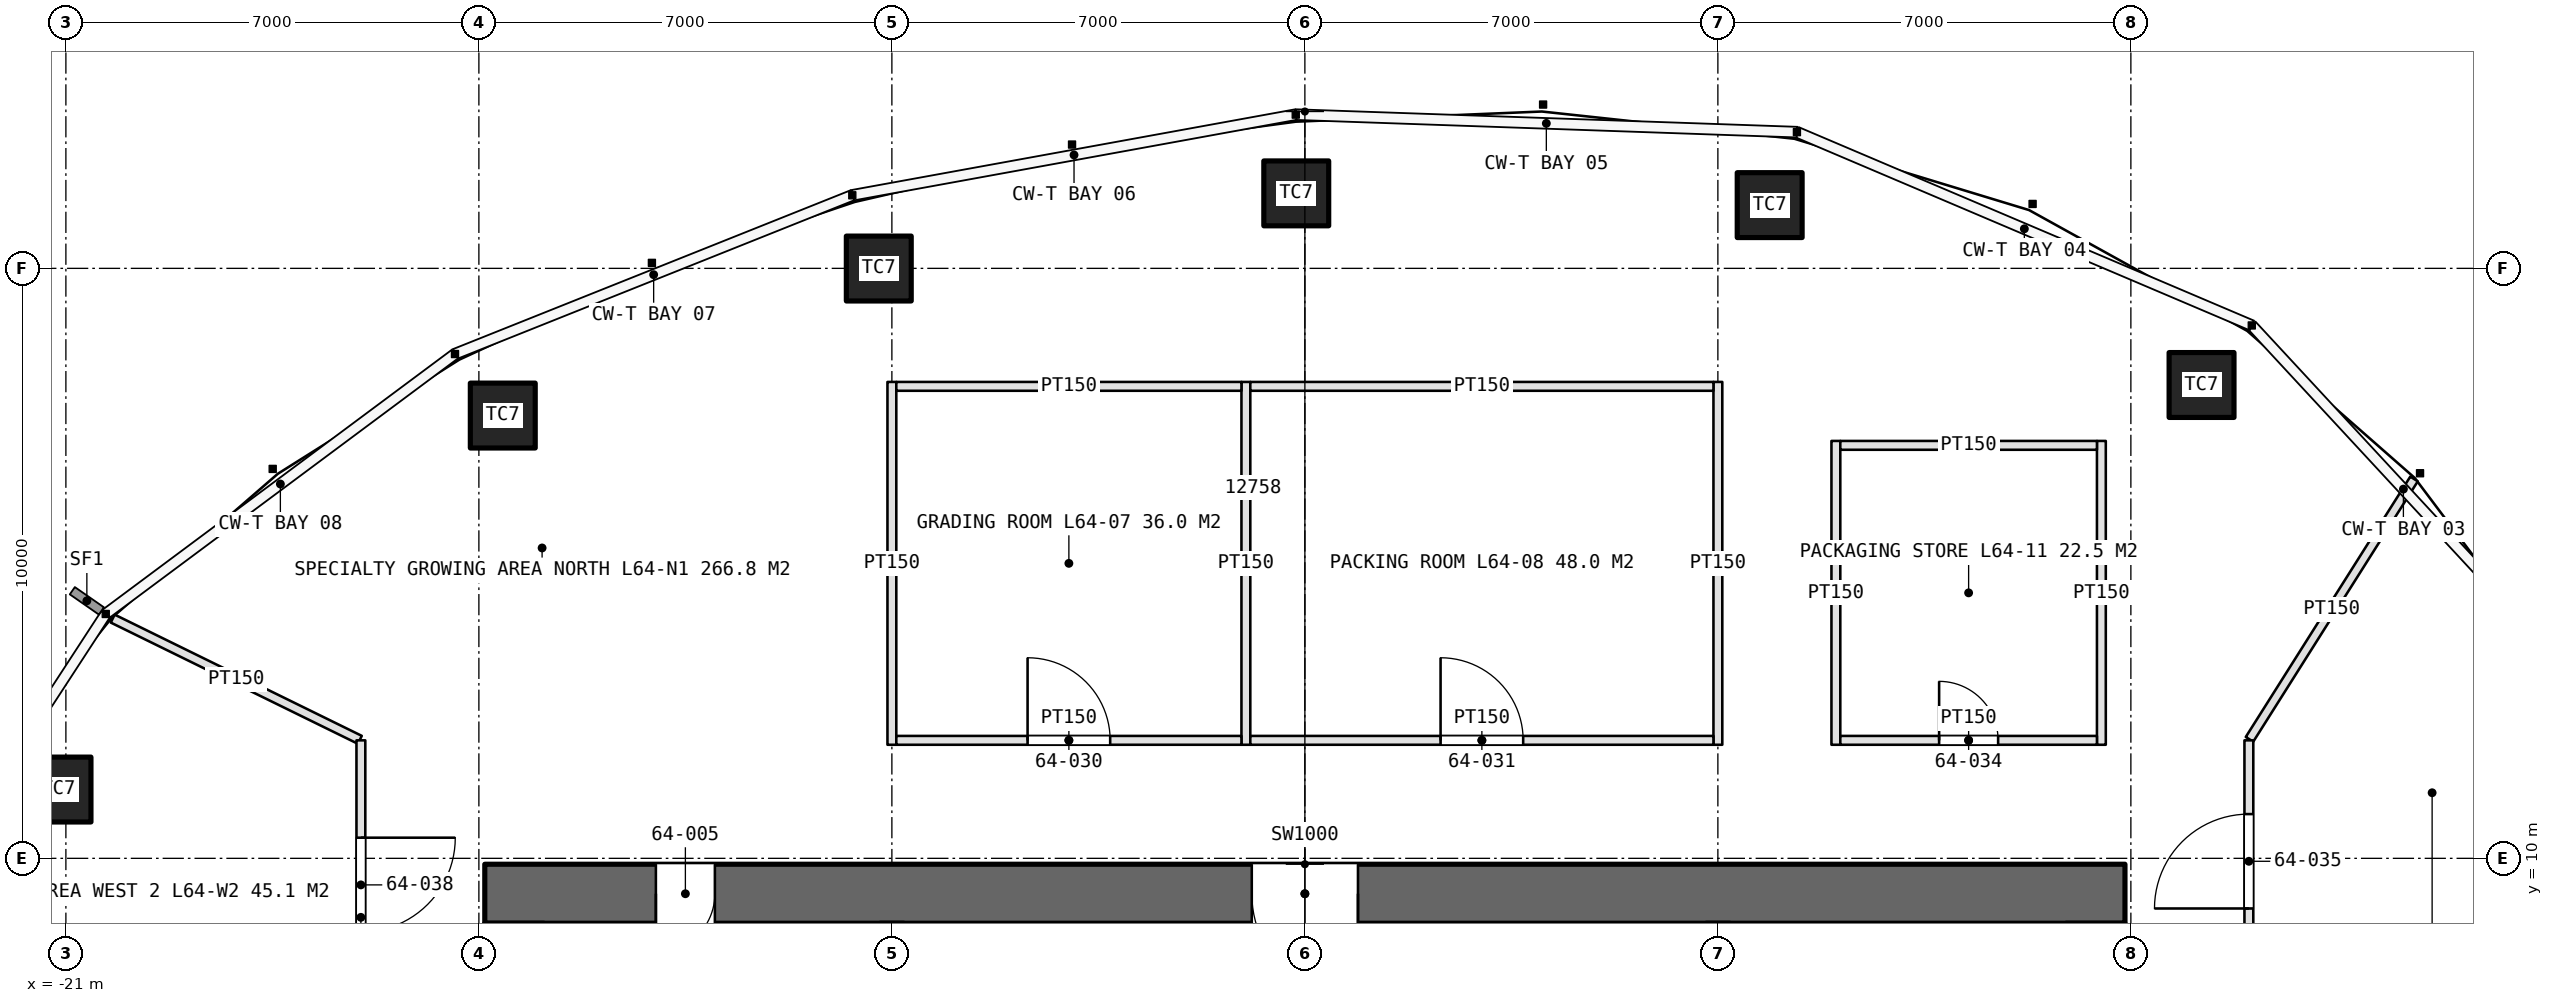
"""IFC4 building model, lengths in metres.
Left out: names, types, materials, properties, quantities, classifications, styles, units other than length and angle.
Written with IfcOpenShell. Run it as: python <this file> out.ifc"""

import sys

from ifc_helpers import new_model, si_unit, direction, frame, frame_2d, origin, origin_2d, place, context, subcontext, project, spatial, rectangle, extrude, element, fill, save


model = new_model("IFC4")
c1 = context("Model", 3, precision=1e-05, world=origin(), true_north=direction((0.0, 1.0)))
c2 = subcontext(c1, "Body", "Model", "MODEL_VIEW")
j1 = project(units=[si_unit("LENGTHUNIT", "METRE"), si_unit("PLANEANGLEUNIT", "RADIAN")], contexts=[c1])
p1 = place(None, origin())
s1 = spatial("IfcSite", under=j1, at=p1, CompositionType="ELEMENT")
p2 = place(p1, origin())
s2 = spatial("IfcBuilding", under=s1, at=p2, CompositionType="ELEMENT")
p3 = place(p2, frame((0.0, 0.0, 288.0)))
s3 = spatial("IfcBuildingStorey", under=s2, at=p3, CompositionType="ELEMENT", Elevation=288.0)
p4 = place(p3, frame((13.9, 9.4, 0.0), z_axis=(0.0, 0.0, 1.0), x_axis=(-1.0, 0.0, 0.0)))
e1 = element("IfcWall", 1, at=p4, inside=s3, PredefinedType="SHEAR", context=c2, shape_type="SweptSolid", body=[
    extrude(rectangle(XDim=27.8, YDim=1.0, at=frame_2d((13.9, 0.0))), origin(), (0.0, 0.0, 1.0), 4.2),
])
p5 = place(p4, frame((23.9, 0.0, 0.0)))
e2 = element("IfcOpeningElement", 2, at=p5, cuts=e1, PredefinedType="OPENING", context=c2, shape_type="SweptSolid", body=[
    extrude(rectangle(XDim=1.0, YDim=2.4, at=frame_2d((0.5, 1.2))), frame((0.0, 0.51, 0.0), z_axis=(0.0, -1.0, 0.0), x_axis=(1.0, 0.0, 0.0)), (0.0, 0.0, 1.0), 1.02),
])
p6 = place(p4, frame((13.0, 0.0, 0.0)))
e3 = element("IfcOpeningElement", 3, at=p6, cuts=e1, PredefinedType="OPENING", context=c2, shape_type="SweptSolid", body=[
    extrude(rectangle(XDim=1.8, YDim=2.4, at=frame_2d((0.9, 1.2))), frame((0.0, 0.51, 0.0), z_axis=(0.0, -1.0, 0.0), x_axis=(1.0, 0.0, 0.0)), (0.0, 0.0, 1.0), 1.02),
])
for number, where, z_axis, x_axis in (
    (4, (15.198, 18.023, 0.0), (0.0, 0.0, 1.0), (1.0, 0.0, 0.0)),
    (5, (7.878, 21.072, 0.0), (0.0, 0.0, 1.0), (1.0, 0.0, 0.0)),
    (6, (-0.146, 21.271, 0.0), (0.0, 0.0, 1.0), (1.0, 0.0, 0.0)),
    (7, (-7.222, 19.997, 0.0), (0.0, 0.0, 1.0), (1.0, 0.0, 0.0)),
    (8, (-13.595, 17.505, 0.0), (0.0, 0.0, 1.0), (1.0, 0.0, 0.0)),
    (9, (-21.125, 11.166, 0.0), (0.0, 0.0, 1.0), (1.0, 0.0, 0.0)),
):
    element("IfcColumn", number, at=place(p3, frame(where, z_axis=z_axis, x_axis=x_axis)), inside=s3, PredefinedType="COLUMN", context=c2, shape_type="SweptSolid", body=[
        extrude(rectangle(XDim=1.1, YDim=1.1, at=origin_2d()), origin(), (0.0, 0.0, 1.0), 4.2),
    ])
for number, where, z_axis, x_axis in (
    (10, (-7.0, 11.925, 0.0), (0.0, 0.0, 1.0), (0.0, 1.0, 0.0)),
    (11, (-1.0, 11.925, 0.0), (0.0, 0.0, 1.0), (0.0, 1.0, 0.0)),
    (12, (7.0, 11.925, 0.0), (0.0, 0.0, 1.0), (0.0, 1.0, 0.0)),
):
    element("IfcWall", number, at=place(p3, frame(where, z_axis=z_axis, x_axis=x_axis)), inside=s3, PredefinedType="PARTITIONING", context=c2, shape_type="SweptSolid", body=[
        extrude(rectangle(XDim=6.15, YDim=0.15, at=frame_2d((3.075, 0.0))), origin(), (0.0, 0.0, 1.0), 3.0),
    ])
p7 = place(p3, frame((-6.925, 12.0, 0.0), z_axis=(0.0, 0.0, 1.0), x_axis=(1.0, 0.0, 0.0)))
e13 = element("IfcWall", 13, at=p7, inside=s3, PredefinedType="PARTITIONING", context=c2, shape_type="SweptSolid", body=[
    extrude(rectangle(XDim=5.85, YDim=0.15, at=frame_2d((2.925, 0.0))), origin(), (0.0, 0.0, 1.0), 3.0),
])
p8 = place(p7, frame((2.225, 0.0, 0.0)))
e14 = element("IfcOpeningElement", 14, at=p8, cuts=e13, PredefinedType="OPENING", context=c2, shape_type="SweptSolid", body=[
    extrude(rectangle(XDim=1.4, YDim=2.4, at=frame_2d((0.7, 1.2))), frame((0.0, 0.085, 0.0), z_axis=(0.0, -1.0, 0.0), x_axis=(1.0, 0.0, 0.0)), (0.0, 0.0, 1.0), 0.17),
])
p9 = place(p3, frame((-6.925, 18.0, 0.0), z_axis=(0.0, 0.0, 1.0), x_axis=(1.0, 0.0, 0.0)))
e15 = element("IfcWall", 15, at=p9, inside=s3, PredefinedType="PARTITIONING", context=c2, shape_type="SweptSolid", body=[
    extrude(rectangle(XDim=5.85, YDim=0.15, at=frame_2d((2.925, 0.0))), origin(), (0.0, 0.0, 1.0), 3.0),
])
p10 = place(p3, frame((-0.925, 12.0, 0.0), z_axis=(0.0, 0.0, 1.0), x_axis=(1.0, 0.0, 0.0)))
e16 = element("IfcWall", 16, at=p10, inside=s3, PredefinedType="PARTITIONING", context=c2, shape_type="SweptSolid", body=[
    extrude(rectangle(XDim=7.85, YDim=0.15, at=frame_2d((3.925, 0.0))), origin(), (0.0, 0.0, 1.0), 3.0),
])
p11 = place(p10, frame((3.225, 0.0, 0.0)))
e17 = element("IfcOpeningElement", 17, at=p11, cuts=e16, PredefinedType="OPENING", context=c2, shape_type="SweptSolid", body=[
    extrude(rectangle(XDim=1.4, YDim=2.4, at=frame_2d((0.7, 1.2))), frame((0.0, 0.085, 0.0), z_axis=(0.0, -1.0, 0.0), x_axis=(1.0, 0.0, 0.0)), (0.0, 0.0, 1.0), 0.17),
])
p12 = place(p3, frame((-0.925, 18.0, 0.0), z_axis=(0.0, 0.0, 1.0), x_axis=(1.0, 0.0, 0.0)))
e18 = element("IfcWall", 18, at=p12, inside=s3, PredefinedType="PARTITIONING", context=c2, shape_type="SweptSolid", body=[
    extrude(rectangle(XDim=7.85, YDim=0.15, at=frame_2d((3.925, 0.0))), origin(), (0.0, 0.0, 1.0), 3.0),
])
for number, where, z_axis, x_axis in (
    (19, (9.0, 11.925, 0.0), (0.0, 0.0, 1.0), (0.0, 1.0, 0.0)),
    (20, (13.5, 11.925, 0.0), (0.0, 0.0, 1.0), (0.0, 1.0, 0.0)),
):
    element("IfcWall", number, at=place(p3, frame(where, z_axis=z_axis, x_axis=x_axis)), inside=s3, PredefinedType="PARTITIONING", context=c2, shape_type="SweptSolid", body=[
        extrude(rectangle(XDim=5.15, YDim=0.15, at=frame_2d((2.575, 0.0))), origin(), (0.0, 0.0, 1.0), 3.0),
    ])
p13 = place(p3, frame((9.075, 12.0, 0.0), z_axis=(0.0, 0.0, 1.0), x_axis=(1.0, 0.0, 0.0)))
e21 = element("IfcWall", 21, at=p13, inside=s3, PredefinedType="PARTITIONING", context=c2, shape_type="SweptSolid", body=[
    extrude(rectangle(XDim=4.35, YDim=0.15, at=frame_2d((2.175, 0.0))), origin(), (0.0, 0.0, 1.0), 3.0),
])
p14 = place(p13, frame((1.675, 0.0, 0.0)))
e22 = element("IfcOpeningElement", 22, at=p14, cuts=e21, PredefinedType="OPENING", context=c2, shape_type="SweptSolid", body=[
    extrude(rectangle(XDim=1.0, YDim=2.2, at=frame_2d((0.5, 1.1))), frame((0.0, 0.085, 0.0), z_axis=(0.0, -1.0, 0.0), x_axis=(1.0, 0.0, 0.0)), (0.0, 0.0, 1.0), 0.17),
])
p15 = place(p3, frame((9.075, 17.0, 0.0), z_axis=(0.0, 0.0, 1.0), x_axis=(1.0, 0.0, 0.0)))
e23 = element("IfcWall", 23, at=p15, inside=s3, PredefinedType="PARTITIONING", context=c2, shape_type="SweptSolid", body=[
    extrude(rectangle(XDim=4.35, YDim=0.15, at=frame_2d((2.175, 0.0))), origin(), (0.0, 0.0, 1.0), 3.0),
])
p16 = place(p3, frame((-16.018, 12.009, 0.0), z_axis=(0.0, 0.0, 1.0), x_axis=(-0.897771840996, 0.440460805879, 0.0)))
e24 = element("IfcWall", 24, at=p16, inside=s3, PredefinedType="PARTITIONING", context=c2, shape_type="SweptSolid", body=[
    extrude(rectangle(XDim=4.666, YDim=0.15, at=frame_2d((2.333, 0.0))), origin(), (0.0, 0.0, 1.0), 3.0),
])
p17 = place(p3, frame((16.011, 12.017, 0.0), z_axis=(0.0, 0.0, 1.0), x_axis=(0.53415837449, 0.845384427916, 0.0)))
e25 = element("IfcWall", 25, at=p17, inside=s3, PredefinedType="PARTITIONING", context=c2, shape_type="SweptSolid", body=[
    extrude(rectangle(XDim=5.22, YDim=0.15, at=frame_2d((2.61, 0.0))), origin(), (0.0, 0.0, 1.0), 3.0),
])
p18 = place(p3, frame((16.0, 5.0, 0.0), z_axis=(0.0, 0.0, 1.0), x_axis=(0.0, 1.0, 0.0)))
e26 = element("IfcWall", 26, at=p18, inside=s3, PredefinedType="PARTITIONING", context=c2, shape_type="SweptSolid", body=[
    extrude(rectangle(XDim=7.0, YDim=0.15, at=frame_2d((3.5, 0.0))), origin(), (0.0, 0.0, 1.0), 3.0),
])
p19 = place(p18, frame((4.15, 0.0, 0.0)))
e27 = element("IfcOpeningElement", 27, at=p19, cuts=e26, PredefinedType="OPENING", context=c2, shape_type="SweptSolid", body=[
    extrude(rectangle(XDim=1.6, YDim=2.4, at=frame_2d((0.8, 1.2))), frame((0.0, 0.085, 0.0), z_axis=(0.0, -1.0, 0.0), x_axis=(1.0, 0.0, 0.0)), (0.0, 0.0, 1.0), 0.17),
])
p20 = place(p3, frame((-16.0, 12.0, 0.0), z_axis=(0.0, 0.0, 1.0), x_axis=(0.0, -1.0, 0.0)))
e28 = element("IfcWall", 28, at=p20, inside=s3, PredefinedType="PARTITIONING", context=c2, shape_type="SweptSolid", body=[
    extrude(rectangle(XDim=6.0, YDim=0.15, at=frame_2d((3.0, 0.0))), origin(), (0.0, 0.0, 1.0), 3.0),
])
p21 = place(p20, frame((1.65, 0.0, 0.0)))
e29 = element("IfcOpeningElement", 29, at=p21, cuts=e28, PredefinedType="OPENING", context=c2, shape_type="SweptSolid", body=[
    extrude(rectangle(XDim=1.6, YDim=2.4, at=frame_2d((0.8, 1.2))), frame((0.0, 0.085, 0.0), z_axis=(0.0, -1.0, 0.0), x_axis=(1.0, 0.0, 0.0)), (0.0, 0.0, 1.0), 0.17),
])
p22 = place(p5, origin())
e30 = element("IfcDoor", 30, at=p22, inside=s3, OperationType="SINGLE_SWING_RIGHT", PredefinedType="DOOR", context=c2, shape_type="SweptSolid", body=[
    extrude(rectangle(XDim=1.0, YDim=2.4, at=frame_2d((0.5, 1.2))), frame((0.0, 0.025, 0.0), z_axis=(0.0, -1.0, 0.0), x_axis=(1.0, 0.0, 0.0)), (0.0, 0.0, 1.0), 0.05),
])
fill(e2, e30)
p23 = place(p6, origin())
e31 = element("IfcDoor", 31, at=p23, inside=s3, OperationType="DOUBLE_DOOR_SINGLE_SWING", PredefinedType="DOOR", context=c2, shape_type="SweptSolid", body=[
    extrude(rectangle(XDim=1.8, YDim=2.4, at=frame_2d((0.9, 1.2))), frame((0.0, 0.025, 0.0), z_axis=(0.0, -1.0, 0.0), x_axis=(1.0, 0.0, 0.0)), (0.0, 0.0, 1.0), 0.05),
])
fill(e3, e31)
p24 = place(p8, origin())
e32 = element("IfcDoor", 32, at=p24, inside=s3, OperationType="DOUBLE_DOOR_DOUBLE_SWING", PredefinedType="DOOR", context=c2, shape_type="SweptSolid", body=[
    extrude(rectangle(XDim=1.4, YDim=2.4, at=frame_2d((0.7, 1.2))), frame((0.0, 0.025, 0.0), z_axis=(0.0, -1.0, 0.0), x_axis=(1.0, 0.0, 0.0)), (0.0, 0.0, 1.0), 0.05),
])
fill(e14, e32)
p25 = place(p11, origin())
e33 = element("IfcDoor", 33, at=p25, inside=s3, OperationType="DOUBLE_DOOR_DOUBLE_SWING", PredefinedType="DOOR", context=c2, shape_type="SweptSolid", body=[
    extrude(rectangle(XDim=1.4, YDim=2.4, at=frame_2d((0.7, 1.2))), frame((0.0, 0.025, 0.0), z_axis=(0.0, -1.0, 0.0), x_axis=(1.0, 0.0, 0.0)), (0.0, 0.0, 1.0), 0.05),
])
fill(e17, e33)
p26 = place(p14, origin())
e34 = element("IfcDoor", 34, at=p26, inside=s3, OperationType="SINGLE_SWING_LEFT", PredefinedType="DOOR", context=c2, shape_type="SweptSolid", body=[
    extrude(rectangle(XDim=1.0, YDim=2.2, at=frame_2d((0.5, 1.1))), frame((0.0, 0.025, 0.0), z_axis=(0.0, -1.0, 0.0), x_axis=(1.0, 0.0, 0.0)), (0.0, 0.0, 1.0), 0.05),
])
fill(e22, e34)
p27 = place(p19, origin())
e35 = element("IfcDoor", 35, at=p27, inside=s3, OperationType="DOUBLE_DOOR_SINGLE_SWING", PredefinedType="DOOR", context=c2, shape_type="SweptSolid", body=[
    extrude(rectangle(XDim=1.6, YDim=2.4, at=frame_2d((0.8, 1.2))), frame((0.0, 0.025, 0.0), z_axis=(0.0, -1.0, 0.0), x_axis=(1.0, 0.0, 0.0)), (0.0, 0.0, 1.0), 0.05),
])
fill(e27, e35)
p28 = place(p21, origin())
e36 = element("IfcDoor", 36, at=p28, inside=s3, OperationType="DOUBLE_DOOR_SINGLE_SWING", PredefinedType="DOOR", context=c2, shape_type="SweptSolid", body=[
    extrude(rectangle(XDim=1.6, YDim=2.4, at=frame_2d((0.8, 1.2))), frame((0.0, 0.025, 0.0), z_axis=(0.0, -1.0, 0.0), x_axis=(1.0, 0.0, 0.0)), (0.0, 0.0, 1.0), 0.05),
])
fill(e29, e36)
save(model, sys.argv[1])
